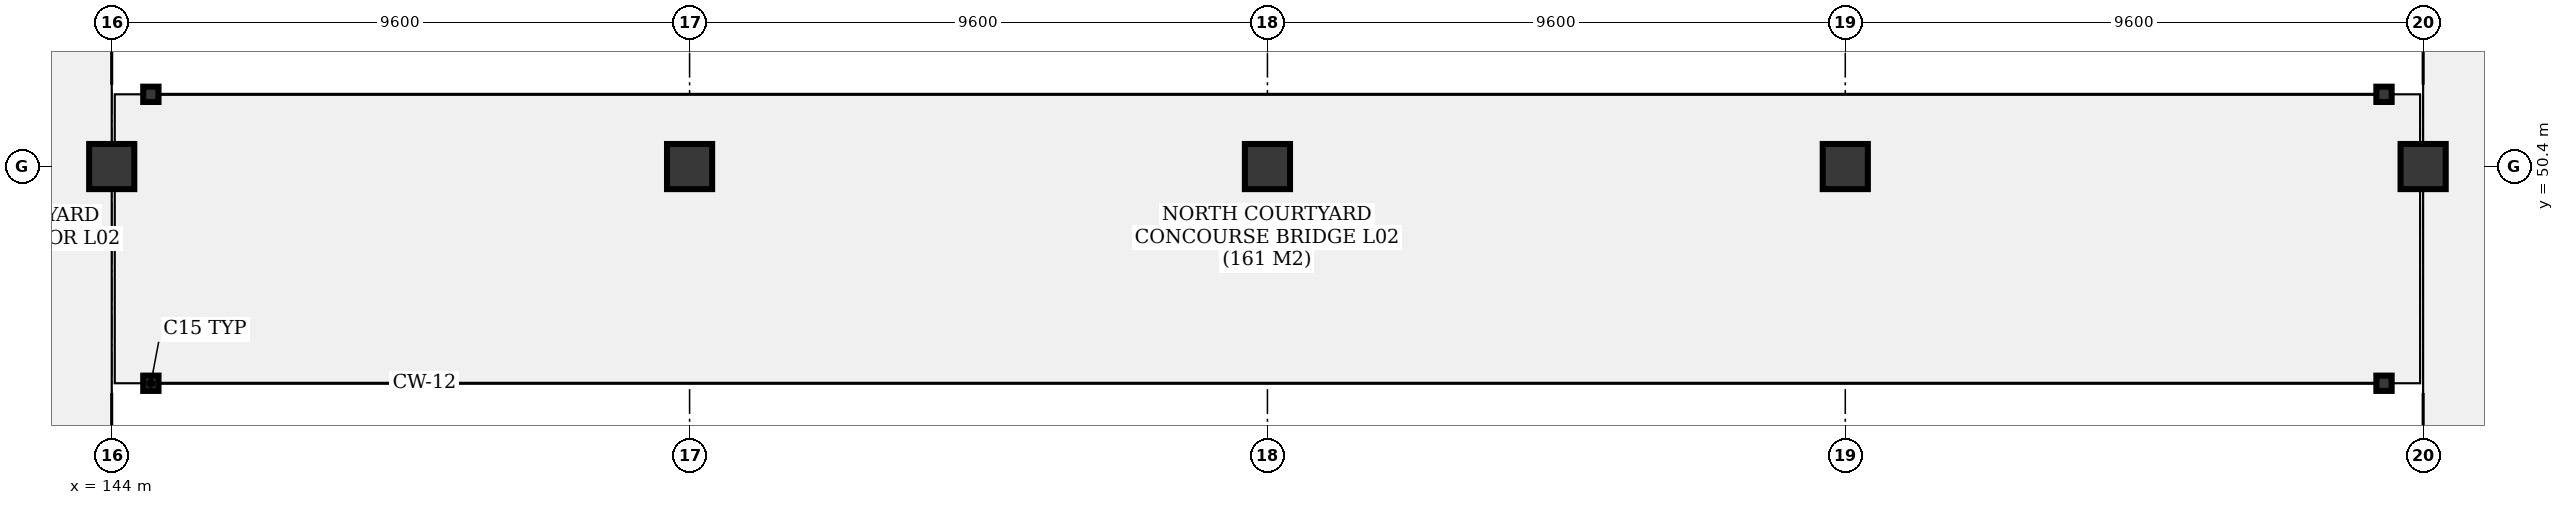
"""IFC4 building model, lengths in metres.
Left out: names, types, materials, properties, quantities, classifications, styles, units other than length and angle.
Written with IfcOpenShell. Run it as: python <this file> out.ifc"""

import sys

from ifc_helpers import new_model, si_unit, direction, frame, origin, origin_2d, place, context, subcontext, project, spatial, rectangle, hollow_rectangle, extrude, element, save


model = new_model("IFC4")
c1 = context("Model", 3, precision=1e-05, world=origin(), true_north=direction((0.0, 1.0)))
c2 = subcontext(c1, "Body", "Model", "MODEL_VIEW")
j1 = project(units=[si_unit("LENGTHUNIT", "METRE"), si_unit("PLANEANGLEUNIT", "RADIAN")], contexts=[c1])
p1 = place(None, origin())
s1 = spatial("IfcSite", under=j1, at=p1, CompositionType="ELEMENT")
p2 = place(p1, origin())
s2 = spatial("IfcBuilding", under=s1, at=p2, CompositionType="ELEMENT")
p3 = place(p2, frame((0.0, 0.0, 9.9)))
s3 = spatial("IfcBuildingStorey", under=s2, at=p3, CompositionType="ELEMENT", Elevation=9.9)
p4 = place(p3, frame((144.0, 50.4, 0.0), z_axis=(0.0, 0.0, 1.0), x_axis=(1.0, 0.0, 0.0)))
e1 = element("IfcColumn", 1, at=p4, inside=s3, PredefinedType="COLUMN", context=c2, shape_type="SweptSolid", body=[
    extrude(rectangle(XDim=0.75, YDim=0.75, at=origin_2d()), origin(), (0.0, 0.0, 1.0), 3.6),
])
for number, where, z_axis, x_axis in (
    (2, (144.65, 46.8, 0.0), (0.0, 0.0, 1.0), (1.0, 0.0, 0.0)),
    (3, (144.65, 51.6, 0.0), (0.0, 0.0, 1.0), (1.0, 0.0, 0.0)),
):
    element("IfcColumn", number, at=place(p3, frame(where, z_axis=z_axis, x_axis=x_axis)), inside=s3, PredefinedType="COLUMN", context=c2, shape_type="SweptSolid", body=[
        extrude(hollow_rectangle(XDim=0.254, YDim=0.254, WallThickness=0.013, at=origin_2d()), origin(), (0.0, 0.0, 1.0), 3.38),
    ])
for number, where, z_axis, x_axis in (
    (4, (153.6, 50.4, 0.0), (0.0, 0.0, 1.0), (1.0, 0.0, 0.0)),
    (5, (163.2, 50.4, 0.0), (0.0, 0.0, 1.0), (1.0, 0.0, 0.0)),
    (6, (172.8, 50.4, 0.0), (0.0, 0.0, 1.0), (1.0, 0.0, 0.0)),
):
    element("IfcColumn", number, at=place(p3, frame(where, z_axis=z_axis, x_axis=x_axis)), inside=s3, PredefinedType="COLUMN", context=c2, shape_type="SweptSolid", body=[
        extrude(rectangle(XDim=0.75, YDim=0.75, at=origin_2d()), origin(), (0.0, 0.0, 1.0), 3.6),
    ])
for number, where, z_axis, x_axis in (
    (7, (181.75, 46.8, 0.0), (0.0, 0.0, 1.0), (1.0, 0.0, 0.0)),
    (8, (181.75, 51.6, 0.0), (0.0, 0.0, 1.0), (1.0, 0.0, 0.0)),
):
    element("IfcColumn", number, at=place(p3, frame(where, z_axis=z_axis, x_axis=x_axis)), inside=s3, PredefinedType="COLUMN", context=c2, shape_type="SweptSolid", body=[
        extrude(hollow_rectangle(XDim=0.254, YDim=0.254, WallThickness=0.013, at=origin_2d()), origin(), (0.0, 0.0, 1.0), 3.38),
    ])
p5 = place(p3, frame((182.4, 50.4, 0.0), z_axis=(0.0, 0.0, 1.0), x_axis=(1.0, 0.0, 0.0)))
e9 = element("IfcColumn", 9, at=p5, inside=s3, PredefinedType="COLUMN", context=c2, shape_type="SweptSolid", body=[
    extrude(rectangle(XDim=0.75, YDim=0.75, at=origin_2d()), origin(), (0.0, 0.0, 1.0), 3.6),
])
save(model, sys.argv[1])
